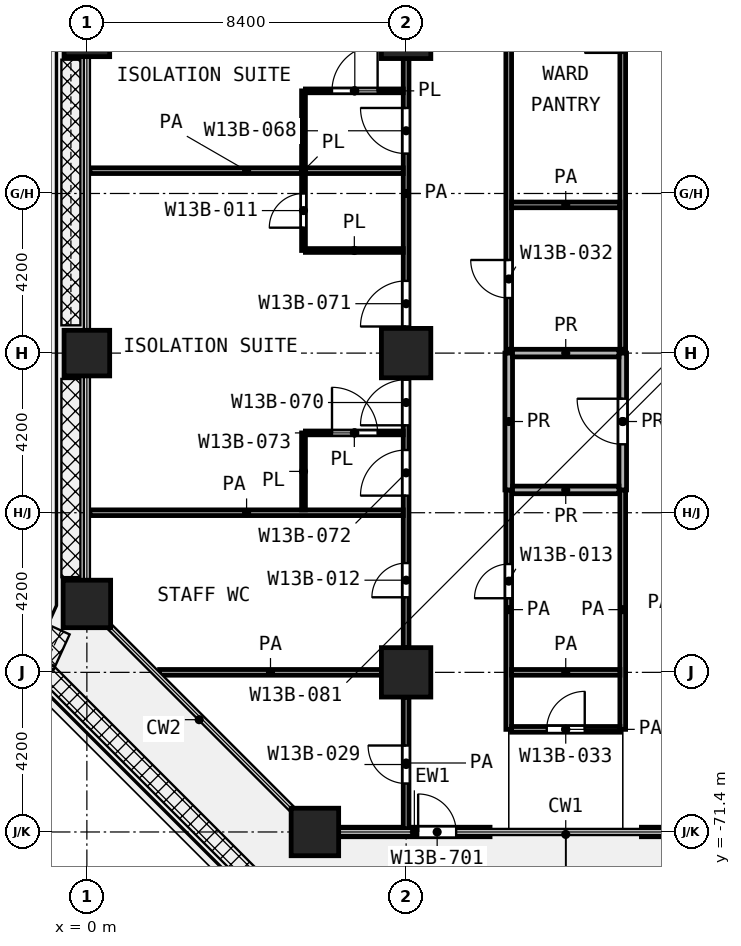
"""IFC4 building model, lengths in metres.
Left out: names, types, materials, properties, quantities, classifications, styles, units other than length and angle.
Written with IfcOpenShell. Run it as: python <this file> out.ifc"""

import sys

from ifc_helpers import new_model, si_unit, direction, frame, frame_2d, origin, origin_2d, place, context, subcontext, project, spatial, rectangle, extrude, element, fill, save


model = new_model("IFC4")
c1 = context("Model", 3, precision=1e-05, world=origin(), true_north=direction((0.0, 1.0)))
c2 = subcontext(c1, "Body", "Model", "MODEL_VIEW")
j1 = project(units=[si_unit("LENGTHUNIT", "METRE"), si_unit("PLANEANGLEUNIT", "RADIAN")], contexts=[c1])
p1 = place(None, origin())
s1 = spatial("IfcSite", under=j1, at=p1, CompositionType="ELEMENT")
p2 = place(p1, origin())
s2 = spatial("IfcBuilding", under=s1, at=p2, CompositionType="ELEMENT")
p3 = place(p2, frame((0.0, 0.0, 89.6)))
s3 = spatial("IfcBuildingStorey", under=s2, at=p3, CompositionType="ELEMENT", Elevation=89.6)
p4 = place(p3, frame((0.0, -50.4, 0.0), z_axis=(0.0, 0.0, 1.0), x_axis=(1.0, 0.0, 0.0)))
e1 = element("IfcColumn", 1, at=p4, inside=s3, PredefinedType="COLUMN", context=c2, shape_type="SweptSolid", body=[
    extrude(rectangle(XDim=1.2, YDim=1.2, at=origin_2d()), origin(), (0.0, 0.0, 1.0), 4.2),
])
p5 = place(p3, frame((8.4, -50.4, 0.0), z_axis=(0.0, 0.0, 1.0), x_axis=(1.0, 0.0, 0.0)))
e2 = element("IfcColumn", 2, at=p5, inside=s3, PredefinedType="COLUMN", context=c2, shape_type="SweptSolid", body=[
    extrude(rectangle(XDim=1.3, YDim=1.3, at=origin_2d()), origin(), (0.0, 0.0, 1.0), 4.2),
])
p6 = place(p3, frame((0.0, -58.8, 0.0), z_axis=(0.0, 0.0, 1.0), x_axis=(1.0, 0.0, 0.0)))
e3 = element("IfcColumn", 3, at=p6, inside=s3, PredefinedType="COLUMN", context=c2, shape_type="SweptSolid", body=[
    extrude(rectangle(XDim=1.2, YDim=1.2, at=origin_2d()), origin(), (0.0, 0.0, 1.0), 4.2),
])
p7 = place(p3, frame((8.4, -58.8, 0.0), z_axis=(0.0, 0.0, 1.0), x_axis=(1.0, 0.0, 0.0)))
e4 = element("IfcColumn", 4, at=p7, inside=s3, PredefinedType="COLUMN", context=c2, shape_type="SweptSolid", body=[
    extrude(rectangle(XDim=1.3, YDim=1.3, at=origin_2d()), origin(), (0.0, 0.0, 1.0), 4.2),
])
p8 = place(p3, frame((0.0, -65.4, 0.0), z_axis=(0.0, 0.0, 1.0), x_axis=(1.0, 0.0, 0.0)))
e5 = element("IfcColumn", 5, at=p8, inside=s3, PredefinedType="COLUMN", context=c2, shape_type="SweptSolid", body=[
    extrude(rectangle(XDim=1.25, YDim=1.25, at=origin_2d()), origin(), (0.0, 0.0, 1.0), 4.2),
])
p9 = place(p3, frame((8.4, -67.2, 0.0), z_axis=(0.0, 0.0, 1.0), x_axis=(1.0, 0.0, 0.0)))
e6 = element("IfcColumn", 6, at=p9, inside=s3, PredefinedType="COLUMN", context=c2, shape_type="SweptSolid", body=[
    extrude(rectangle(XDim=1.3, YDim=1.3, at=origin_2d()), origin(), (0.0, 0.0, 1.0), 4.2),
])
p10 = place(p3, frame((6.0, -71.4, 0.0), z_axis=(0.0, 0.0, 1.0), x_axis=(1.0, 0.0, 0.0)))
e7 = element("IfcColumn", 7, at=p10, inside=s3, PredefinedType="COLUMN", context=c2, shape_type="SweptSolid", body=[
    extrude(rectangle(XDim=1.25, YDim=1.25, at=origin_2d()), origin(), (0.0, 0.0, 1.0), 4.2),
])
p11 = place(p3, frame((6.625, -71.4, 0.0), z_axis=(0.0, 0.0, 1.0), x_axis=(1.0, 0.0, 0.0)))
e8 = element("IfcWall", 8, at=p11, inside=s3, PredefinedType="SOLIDWALL", context=c2, shape_type="SweptSolid", body=[
    extrude(rectangle(XDim=3.983, YDim=0.25, at=frame_2d((1.992, 0.0))), origin(), (0.0, 0.0, 1.0), 3.58),
])
p12 = place(p11, frame((2.092, 0.0, 0.0)))
e9 = element("IfcOpeningElement", 9, at=p12, cuts=e8, PredefinedType="OPENING", context=c2, shape_type="SweptSolid", body=[
    extrude(rectangle(XDim=1.0, YDim=2.1, at=frame_2d((0.5, 1.05))), frame((0.0, 0.135, 0.0), z_axis=(0.0, -1.0, 0.0), x_axis=(1.0, 0.0, 0.0)), (0.0, 0.0, 1.0), 0.27),
])
p13 = place(p3, frame((14.592, -71.4, 0.0), z_axis=(0.0, 0.0, 1.0), x_axis=(1.0, 0.0, 0.0)))
e10 = element("IfcWall", 10, at=p13, inside=s3, PredefinedType="SOLIDWALL", context=c2, shape_type="SweptSolid", body=[
    extrude(rectangle(XDim=3.983, YDim=0.25, at=frame_2d((1.992, 0.0))), origin(), (0.0, 0.0, 1.0), 3.58),
])
p14 = place(p13, frame((0.892, 0.0, 0.0)))
e11 = element("IfcOpeningElement", 11, at=p14, cuts=e10, PredefinedType="OPENING", context=c2, shape_type="SweptSolid", body=[
    extrude(rectangle(XDim=1.0, YDim=2.1, at=frame_2d((0.5, 1.05))), frame((0.0, 0.135, 0.0), z_axis=(0.0, -1.0, 0.0), x_axis=(1.0, 0.0, 0.0)), (0.0, 0.0, 1.0), 0.27),
])
p15 = place(p3, frame((5.75, -60.9, 0.0), z_axis=(0.0, 0.0, 1.0), x_axis=(1.0, 0.0, 0.0)))
e12 = element("IfcWall", 12, at=p15, inside=s3, PredefinedType="PARTITIONING", context=c2, shape_type="SweptSolid", body=[
    extrude(rectangle(XDim=2.575, YDim=0.1, at=frame_2d((1.288, 0.0))), origin(), (0.0, 0.0, 1.0), 3.7),
])
p16 = place(p15, frame((0.7, 0.0, 0.0)))
e13 = element("IfcOpeningElement", 13, at=p16, cuts=e12, PredefinedType="OPENING", context=c2, shape_type="SweptSolid", body=[
    extrude(rectangle(XDim=1.2, YDim=2.1, at=frame_2d((0.6, 1.05))), frame((0.0, 0.06, 0.0), z_axis=(0.0, -1.0, 0.0), x_axis=(1.0, 0.0, 0.0)), (0.0, 0.0, 1.0), 0.12),
])
p17 = place(p3, frame((5.75, -56.1, 0.0), z_axis=(0.0, 0.0, 1.0), x_axis=(1.0, 0.0, 0.0)))
e14 = element("IfcWall", 14, at=p17, inside=s3, PredefinedType="PARTITIONING", context=c2, shape_type="SweptSolid", body=[
    extrude(rectangle(XDim=2.575, YDim=0.1, at=frame_2d((1.288, 0.0))), origin(), (0.0, 0.0, 1.0), 3.7),
])
p18 = place(p3, frame((5.75, -51.9, 0.0), z_axis=(0.0, 0.0, 1.0), x_axis=(1.0, 0.0, 0.0)))
e15 = element("IfcWall", 15, at=p18, inside=s3, PredefinedType="PARTITIONING", context=c2, shape_type="SweptSolid", body=[
    extrude(rectangle(XDim=2.575, YDim=0.1, at=frame_2d((1.288, 0.0))), origin(), (0.0, 0.0, 1.0), 3.7),
])
p19 = place(p18, frame((0.7, 0.0, 0.0)))
e16 = element("IfcOpeningElement", 16, at=p19, cuts=e15, PredefinedType="OPENING", context=c2, shape_type="SweptSolid", body=[
    extrude(rectangle(XDim=1.2, YDim=2.1, at=frame_2d((0.6, 1.05))), frame((0.0, 0.06, 0.0), z_axis=(0.0, -1.0, 0.0), x_axis=(1.0, 0.0, 0.0)), (0.0, 0.0, 1.0), 0.12),
])
p20 = place(p3, frame((5.7, -62.925, 0.0), z_axis=(0.0, 0.0, 1.0), x_axis=(0.0, 1.0, 0.0)))
e17 = element("IfcWall", 17, at=p20, inside=s3, PredefinedType="PARTITIONING", context=c2, shape_type="SweptSolid", body=[
    extrude(rectangle(XDim=2.025, YDim=0.1, at=frame_2d((1.013, 0.0))), origin(), (0.0, 0.0, 1.0), 3.7),
])
p21 = place(p3, frame((5.7, -56.1, 0.0), z_axis=(0.0, 0.0, 1.0), x_axis=(0.0, 1.0, 0.0)))
e18 = element("IfcWall", 18, at=p21, inside=s3, PredefinedType="PARTITIONING", context=c2, shape_type="SweptSolid", body=[
    extrude(rectangle(XDim=4.2, YDim=0.1, at=frame_2d((2.1, 0.0))), origin(), (0.0, 0.0, 1.0), 3.7),
])
p22 = place(p21, frame((0.6, 0.0, 0.0)))
e19 = element("IfcOpeningElement", 19, at=p22, cuts=e18, PredefinedType="OPENING", context=c2, shape_type="SweptSolid", body=[
    extrude(rectangle(XDim=0.9, YDim=2.1, at=frame_2d((0.45, 1.05))), frame((0.0, 0.06, 0.0), z_axis=(0.0, -1.0, 0.0), x_axis=(1.0, 0.0, 0.0)), (0.0, 0.0, 1.0), 0.12),
])
p23 = place(p3, frame((11.175, -68.7, 0.0), z_axis=(0.0, 0.0, 1.0), x_axis=(1.0, 0.0, 0.0)))
e20 = element("IfcWall", 20, at=p23, inside=s3, PredefinedType="PARTITIONING", context=c2, shape_type="SweptSolid", body=[
    extrude(rectangle(XDim=2.85, YDim=0.15, at=frame_2d((1.425, 0.0))), origin(), (0.0, 0.0, 1.0), 3.7),
])
p24 = place(p23, frame((0.925, 0.0, 0.0)))
e21 = element("IfcOpeningElement", 21, at=p24, cuts=e20, PredefinedType="OPENING", context=c2, shape_type="SweptSolid", body=[
    extrude(rectangle(XDim=1.0, YDim=2.1, at=frame_2d((0.5, 1.05))), frame((0.0, 0.085, 0.0), z_axis=(0.0, -1.0, 0.0), x_axis=(1.0, 0.0, 0.0)), (0.0, 0.0, 1.0), 0.17),
])
p25 = place(p3, frame((1.913, -67.2, 0.0), z_axis=(0.0, 0.0, 1.0), x_axis=(1.0, 0.0, 0.0)))
e22 = element("IfcWall", 22, at=p25, inside=s3, PredefinedType="PARTITIONING", context=c2, shape_type="SweptSolid", body=[
    extrude(rectangle(XDim=5.837, YDim=0.15, at=frame_2d((2.918, 0.0))), origin(), (0.0, 0.0, 1.0), 3.7),
])
p26 = place(p3, frame((11.175, -67.2, 0.0), z_axis=(0.0, 0.0, 1.0), x_axis=(1.0, 0.0, 0.0)))
e23 = element("IfcWall", 23, at=p26, inside=s3, PredefinedType="PARTITIONING", context=c2, shape_type="SweptSolid", body=[
    extrude(rectangle(XDim=2.85, YDim=0.15, at=frame_2d((1.425, 0.0))), origin(), (0.0, 0.0, 1.0), 3.7),
])
p27 = place(p3, frame((0.08, -63.0, 0.0), z_axis=(0.0, 0.0, 1.0), x_axis=(1.0, 0.0, 0.0)))
e24 = element("IfcWall", 24, at=p27, inside=s3, PredefinedType="PARTITIONING", context=c2, shape_type="SweptSolid", body=[
    extrude(rectangle(XDim=8.245, YDim=0.15, at=frame_2d((4.123, 0.0))), origin(), (0.0, 0.0, 1.0), 3.7),
])
p28 = place(p3, frame((11.175, -54.9, 0.0), z_axis=(0.0, 0.0, 1.0), x_axis=(1.0, 0.0, 0.0)))
e25 = element("IfcWall", 25, at=p28, inside=s3, PredefinedType="PARTITIONING", context=c2, shape_type="SweptSolid", body=[
    extrude(rectangle(XDim=2.85, YDim=0.15, at=frame_2d((1.425, 0.0))), origin(), (0.0, 0.0, 1.0), 3.7),
])
p29 = place(p3, frame((0.08, -54.0, 0.0), z_axis=(0.0, 0.0, 1.0), x_axis=(1.0, 0.0, 0.0)))
e26 = element("IfcWall", 26, at=p29, inside=s3, PredefinedType="PARTITIONING", context=c2, shape_type="SweptSolid", body=[
    extrude(rectangle(XDim=8.245, YDim=0.15, at=frame_2d((4.123, 0.0))), origin(), (0.0, 0.0, 1.0), 3.7),
])
p30 = place(p3, frame((8.4, -71.32, 0.0), z_axis=(0.0, 0.0, 1.0), x_axis=(0.0, 1.0, 0.0)))
e27 = element("IfcWall", 27, at=p30, inside=s3, PredefinedType="PARTITIONING", context=c2, shape_type="SweptSolid", body=[
    extrude(rectangle(XDim=3.47, YDim=0.15, at=frame_2d((1.735, 0.0))), origin(), (0.0, 0.0, 1.0), 3.7),
])
p31 = place(p30, frame((1.195, 0.0, 0.0)))
e28 = element("IfcOpeningElement", 28, at=p31, cuts=e27, PredefinedType="OPENING", context=c2, shape_type="SweptSolid", body=[
    extrude(rectangle(XDim=1.0, YDim=2.1, at=frame_2d((0.5, 1.05))), frame((0.0, 0.085, 0.0), z_axis=(0.0, -1.0, 0.0), x_axis=(1.0, 0.0, 0.0)), (0.0, 0.0, 1.0), 0.17),
])
p32 = place(p3, frame((8.4, -66.55, 0.0), z_axis=(0.0, 0.0, 1.0), x_axis=(0.0, 1.0, 0.0)))
e29 = element("IfcWall", 29, at=p32, inside=s3, PredefinedType="PARTITIONING", context=c2, shape_type="SweptSolid", body=[
    extrude(rectangle(XDim=23.9, YDim=0.15, at=frame_2d((11.95, 0.0))), origin(), (0.0, 0.0, 1.0), 3.7),
])
p33 = place(p32, frame((16.825, 0.0, 0.0)))
e30 = element("IfcOpeningElement", 30, at=p33, cuts=e29, PredefinedType="OPENING", context=c2, shape_type="SweptSolid", body=[
    extrude(rectangle(XDim=0.9, YDim=2.1, at=frame_2d((0.45, 1.05))), frame((0.0, 0.085, 0.0), z_axis=(0.0, -1.0, 0.0), x_axis=(1.0, 0.0, 0.0)), (0.0, 0.0, 1.0), 0.17),
])
p34 = place(p32, frame((13.0, 0.0, 0.0)))
e31 = element("IfcOpeningElement", 31, at=p34, cuts=e29, PredefinedType="OPENING", context=c2, shape_type="SweptSolid", body=[
    extrude(rectangle(XDim=1.2, YDim=2.1, at=frame_2d((0.6, 1.05))), frame((0.0, 0.085, 0.0), z_axis=(0.0, -1.0, 0.0), x_axis=(1.0, 0.0, 0.0)), (0.0, 0.0, 1.0), 0.17),
])
p35 = place(p32, frame((5.85, 0.0, 0.0)))
e32 = element("IfcOpeningElement", 32, at=p35, cuts=e29, PredefinedType="OPENING", context=c2, shape_type="SweptSolid", body=[
    extrude(rectangle(XDim=1.2, YDim=2.1, at=frame_2d((0.6, 1.05))), frame((0.0, 0.085, 0.0), z_axis=(0.0, -1.0, 0.0), x_axis=(1.0, 0.0, 0.0)), (0.0, 0.0, 1.0), 0.17),
])
p36 = place(p32, frame((8.45, 0.0, 0.0)))
e33 = element("IfcOpeningElement", 33, at=p36, cuts=e29, PredefinedType="OPENING", context=c2, shape_type="SweptSolid", body=[
    extrude(rectangle(XDim=1.2, YDim=2.1, at=frame_2d((0.6, 1.05))), frame((0.0, 0.085, 0.0), z_axis=(0.0, -1.0, 0.0), x_axis=(1.0, 0.0, 0.0)), (0.0, 0.0, 1.0), 0.17),
])
p37 = place(p32, frame((4.0, 0.0, 0.0)))
e34 = element("IfcOpeningElement", 34, at=p37, cuts=e29, PredefinedType="OPENING", context=c2, shape_type="SweptSolid", body=[
    extrude(rectangle(XDim=1.2, YDim=2.1, at=frame_2d((0.6, 1.05))), frame((0.0, 0.085, 0.0), z_axis=(0.0, -1.0, 0.0), x_axis=(1.0, 0.0, 0.0)), (0.0, 0.0, 1.0), 0.17),
])
p38 = place(p32, frame((1.325, 0.0, 0.0)))
e35 = element("IfcOpeningElement", 35, at=p38, cuts=e29, PredefinedType="OPENING", context=c2, shape_type="SweptSolid", body=[
    extrude(rectangle(XDim=0.9, YDim=2.1, at=frame_2d((0.45, 1.05))), frame((0.0, 0.085, 0.0), z_axis=(0.0, -1.0, 0.0), x_axis=(1.0, 0.0, 0.0)), (0.0, 0.0, 1.0), 0.17),
])
p39 = place(p3, frame((11.1, -68.7, 0.0), z_axis=(0.0, 0.0, 1.0), x_axis=(0.0, 1.0, 0.0)))
e36 = element("IfcWall", 36, at=p39, inside=s3, PredefinedType="PARTITIONING", context=c2, shape_type="SweptSolid", body=[
    extrude(rectangle(XDim=6.3, YDim=0.15, at=frame_2d((3.15, 0.0))), origin(), (0.0, 0.0, 1.0), 3.7),
])
p40 = place(p39, frame((3.45, 0.0, 0.0)))
e37 = element("IfcOpeningElement", 37, at=p40, cuts=e36, PredefinedType="OPENING", context=c2, shape_type="SweptSolid", body=[
    extrude(rectangle(XDim=0.9, YDim=2.1, at=frame_2d((0.45, 1.05))), frame((0.0, 0.085, 0.0), z_axis=(0.0, -1.0, 0.0), x_axis=(1.0, 0.0, 0.0)), (0.0, 0.0, 1.0), 0.17),
])
p41 = place(p3, frame((11.1, -58.7, 0.0), z_axis=(0.0, 0.0, 1.0), x_axis=(0.0, 1.0, 0.0)))
e38 = element("IfcWall", 38, at=p41, inside=s3, PredefinedType="PARTITIONING", context=c2, shape_type="SweptSolid", body=[
    extrude(rectangle(XDim=29.3, YDim=0.15, at=frame_2d((14.65, 0.0))), origin(), (0.0, 0.0, 1.0), 3.7),
])
p42 = place(p41, frame((20.55, 0.0, 0.0)))
e39 = element("IfcOpeningElement", 39, at=p42, cuts=e38, PredefinedType="OPENING", context=c2, shape_type="SweptSolid", body=[
    extrude(rectangle(XDim=1.0, YDim=2.1, at=frame_2d((0.5, 1.05))), frame((0.0, 0.085, 0.0), z_axis=(0.0, -1.0, 0.0), x_axis=(1.0, 0.0, 0.0)), (0.0, 0.0, 1.0), 0.17),
])
p43 = place(p41, frame((1.35, 0.0, 0.0)))
e40 = element("IfcOpeningElement", 40, at=p43, cuts=e38, PredefinedType="OPENING", context=c2, shape_type="SweptSolid", body=[
    extrude(rectangle(XDim=1.0, YDim=2.1, at=frame_2d((0.5, 1.05))), frame((0.0, 0.085, 0.0), z_axis=(0.0, -1.0, 0.0), x_axis=(1.0, 0.0, 0.0)), (0.0, 0.0, 1.0), 0.17),
])
p44 = place(p3, frame((14.1, -68.7, 0.0), z_axis=(0.0, 0.0, 1.0), x_axis=(0.0, 1.0, 0.0)))
e41 = element("IfcWall", 41, at=p44, inside=s3, PredefinedType="PARTITIONING", context=c2, shape_type="SweptSolid", body=[
    extrude(rectangle(XDim=6.3, YDim=0.15, at=frame_2d((3.15, 0.0))), origin(), (0.0, 0.0, 1.0), 3.7),
])
p45 = place(p3, frame((14.1, -58.7, 0.0), z_axis=(0.0, 0.0, 1.0), x_axis=(0.0, 1.0, 0.0)))
e42 = element("IfcWall", 42, at=p45, inside=s3, PredefinedType="PARTITIONING", context=c2, shape_type="SweptSolid", body=[
    extrude(rectangle(XDim=29.3, YDim=0.15, at=frame_2d((14.65, 0.0))), origin(), (0.0, 0.0, 1.0), 3.7),
])
p46 = place(p45, frame((7.8, 0.0, 0.0)))
e43 = element("IfcOpeningElement", 43, at=p46, cuts=e42, PredefinedType="OPENING", context=c2, shape_type="SweptSolid", body=[
    extrude(rectangle(XDim=1.0, YDim=2.1, at=frame_2d((0.5, 1.05))), frame((0.0, 0.085, 0.0), z_axis=(0.0, -1.0, 0.0), x_axis=(1.0, 0.0, 0.0)), (0.0, 0.0, 1.0), 0.17),
])
for number, where, z_axis, x_axis in (
    (44, (11.2, -62.4, 0.0), (0.0, 0.0, 1.0), (1.0, 0.0, 0.0)),
    (45, (11.2, -58.8, 0.0), (0.0, 0.0, 1.0), (1.0, 0.0, 0.0)),
):
    element("IfcWall", number, at=place(p3, frame(where, z_axis=z_axis, x_axis=x_axis)), inside=s3, PredefinedType="PARTITIONING", context=c2, shape_type="SweptSolid", body=[
        extrude(rectangle(XDim=2.8, YDim=0.2, at=frame_2d((1.4, 0.0))), origin(), (0.0, 0.0, 1.0), 3.7),
    ])
p47 = place(p3, frame((11.1, -62.4, 0.0), z_axis=(0.0, 0.0, 1.0), x_axis=(0.0, 1.0, 0.0)))
e46 = element("IfcWall", 46, at=p47, inside=s3, PredefinedType="PARTITIONING", context=c2, shape_type="SweptSolid", body=[
    extrude(rectangle(XDim=3.6, YDim=0.2, at=frame_2d((1.8, 0.0))), origin(), (0.0, 0.0, 1.0), 3.7),
])
p48 = place(p3, frame((14.1, -62.4, 0.0), z_axis=(0.0, 0.0, 1.0), x_axis=(0.0, 1.0, 0.0)))
e47 = element("IfcWall", 47, at=p48, inside=s3, PredefinedType="PARTITIONING", context=c2, shape_type="SweptSolid", body=[
    extrude(rectangle(XDim=3.6, YDim=0.2, at=frame_2d((1.8, 0.0))), origin(), (0.0, 0.0, 1.0), 3.7),
])
p49 = place(p48, frame((1.2, 0.0, 0.0)))
e48 = element("IfcOpeningElement", 48, at=p49, cuts=e47, PredefinedType="OPENING", context=c2, shape_type="SweptSolid", body=[
    extrude(rectangle(XDim=1.2, YDim=2.1, at=frame_2d((0.6, 1.05))), frame((0.0, 0.11, 0.0), z_axis=(0.0, -1.0, 0.0), x_axis=(1.0, 0.0, 0.0)), (0.0, 0.0, 1.0), 0.22),
])
p50 = place(p12, origin())
e49 = element("IfcDoor", 49, at=p50, inside=s3, OperationType="SINGLE_SWING_LEFT", PredefinedType="DOOR", context=c2, shape_type="SweptSolid", body=[
    extrude(rectangle(XDim=1.0, YDim=2.1, at=frame_2d((0.5, 1.05))), frame((0.0, 0.025, 0.0), z_axis=(0.0, -1.0, 0.0), x_axis=(1.0, 0.0, 0.0)), (0.0, 0.0, 1.0), 0.05),
])
fill(e9, e49)
p51 = place(p34, origin())
e50 = element("IfcDoor", 50, at=p51, inside=s3, OperationType="SINGLE_SWING_RIGHT", PredefinedType="DOOR", context=c2, shape_type="SweptSolid", body=[
    extrude(rectangle(XDim=1.2, YDim=2.1, at=frame_2d((0.6, 1.05))), frame((0.0, 0.025, 0.0), z_axis=(0.0, -1.0, 0.0), x_axis=(1.0, 0.0, 0.0)), (0.0, 0.0, 1.0), 0.05),
])
fill(e31, e50)
p52 = place(p19, origin())
e51 = element("IfcDoor", 51, at=p52, inside=s3, OperationType="SINGLE_SWING_RIGHT", PredefinedType="DOOR", context=c2, shape_type="SweptSolid", body=[
    extrude(rectangle(XDim=1.2, YDim=2.1, at=frame_2d((0.6, 1.05))), frame((0.0, 0.025, 0.0), z_axis=(0.0, -1.0, 0.0), x_axis=(1.0, 0.0, 0.0)), (0.0, 0.0, 1.0), 0.05),
])
fill(e16, e51)
p53 = place(p35, origin())
e52 = element("IfcDoor", 52, at=p53, inside=s3, OperationType="SINGLE_SWING_LEFT", PredefinedType="DOOR", context=c2, shape_type="SweptSolid", body=[
    extrude(rectangle(XDim=1.2, YDim=2.1, at=frame_2d((0.6, 1.05))), frame((0.0, 0.025, 0.0), z_axis=(0.0, -1.0, 0.0), x_axis=(1.0, 0.0, 0.0)), (0.0, 0.0, 1.0), 0.05),
])
fill(e32, e52)
p54 = place(p36, origin())
e53 = element("IfcDoor", 53, at=p54, inside=s3, OperationType="SINGLE_SWING_LEFT", PredefinedType="DOOR", context=c2, shape_type="SweptSolid", body=[
    extrude(rectangle(XDim=1.2, YDim=2.1, at=frame_2d((0.6, 1.05))), frame((0.0, 0.025, 0.0), z_axis=(0.0, -1.0, 0.0), x_axis=(1.0, 0.0, 0.0)), (0.0, 0.0, 1.0), 0.05),
])
fill(e33, e53)
p55 = place(p37, origin())
e54 = element("IfcDoor", 54, at=p55, inside=s3, OperationType="SINGLE_SWING_LEFT", PredefinedType="DOOR", context=c2, shape_type="SweptSolid", body=[
    extrude(rectangle(XDim=1.2, YDim=2.1, at=frame_2d((0.6, 1.05))), frame((0.0, 0.025, 0.0), z_axis=(0.0, -1.0, 0.0), x_axis=(1.0, 0.0, 0.0)), (0.0, 0.0, 1.0), 0.05),
])
fill(e34, e54)
p56 = place(p16, origin())
e55 = element("IfcDoor", 55, at=p56, inside=s3, OperationType="SINGLE_SWING_LEFT", PredefinedType="DOOR", context=c2, shape_type="SweptSolid", body=[
    extrude(rectangle(XDim=1.2, YDim=2.1, at=frame_2d((0.6, 1.05))), frame((0.0, 0.025, 0.0), z_axis=(0.0, -1.0, 0.0), x_axis=(1.0, 0.0, 0.0)), (0.0, 0.0, 1.0), 0.05),
])
fill(e13, e55)
p57 = place(p22, origin())
e56 = element("IfcDoor", 56, at=p57, inside=s3, OperationType="SINGLE_SWING_LEFT", PredefinedType="DOOR", context=c2, shape_type="SweptSolid", body=[
    extrude(rectangle(XDim=0.9, YDim=2.1, at=frame_2d((0.45, 1.05))), frame((0.0, 0.025, 0.0), z_axis=(0.0, -1.0, 0.0), x_axis=(1.0, 0.0, 0.0)), (0.0, 0.0, 1.0), 0.05),
])
fill(e19, e56)
p58 = place(p38, origin())
e57 = element("IfcDoor", 57, at=p58, inside=s3, OperationType="SINGLE_SWING_LEFT", PredefinedType="DOOR", context=c2, shape_type="SweptSolid", body=[
    extrude(rectangle(XDim=0.9, YDim=2.1, at=frame_2d((0.45, 1.05))), frame((0.0, 0.025, 0.0), z_axis=(0.0, -1.0, 0.0), x_axis=(1.0, 0.0, 0.0)), (0.0, 0.0, 1.0), 0.05),
])
fill(e35, e57)
p59 = place(p31, origin())
e58 = element("IfcDoor", 58, at=p59, inside=s3, OperationType="SINGLE_SWING_RIGHT", PredefinedType="DOOR", context=c2, shape_type="SweptSolid", body=[
    extrude(rectangle(XDim=1.0, YDim=2.1, at=frame_2d((0.5, 1.05))), frame((0.0, 0.025, 0.0), z_axis=(0.0, -1.0, 0.0), x_axis=(1.0, 0.0, 0.0)), (0.0, 0.0, 1.0), 0.05),
])
fill(e28, e58)
p60 = place(p43, origin())
e59 = element("IfcDoor", 59, at=p60, inside=s3, OperationType="SINGLE_SWING_RIGHT", PredefinedType="DOOR", context=c2, shape_type="SweptSolid", body=[
    extrude(rectangle(XDim=1.0, YDim=2.1, at=frame_2d((0.5, 1.05))), frame((0.0, 0.025, 0.0), z_axis=(0.0, -1.0, 0.0), x_axis=(1.0, 0.0, 0.0)), (0.0, 0.0, 1.0), 0.05),
])
fill(e40, e59)
p61 = place(p49, origin())
e60 = element("IfcDoor", 60, at=p61, inside=s3, OperationType="SINGLE_SWING_RIGHT", PredefinedType="DOOR", context=c2, shape_type="SweptSolid", body=[
    extrude(rectangle(XDim=1.2, YDim=2.1, at=frame_2d((0.6, 1.05))), frame((0.0, 0.025, 0.0), z_axis=(0.0, -1.0, 0.0), x_axis=(1.0, 0.0, 0.0)), (0.0, 0.0, 1.0), 0.05),
])
fill(e48, e60)
p62 = place(p40, origin())
e61 = element("IfcDoor", 61, at=p62, inside=s3, OperationType="SINGLE_SWING_LEFT", PredefinedType="DOOR", context=c2, shape_type="SweptSolid", body=[
    extrude(rectangle(XDim=0.9, YDim=2.1, at=frame_2d((0.45, 1.05))), frame((0.0, 0.025, 0.0), z_axis=(0.0, -1.0, 0.0), x_axis=(1.0, 0.0, 0.0)), (0.0, 0.0, 1.0), 0.05),
])
fill(e37, e61)
p63 = place(p24, origin())
e62 = element("IfcDoor", 62, at=p63, inside=s3, OperationType="SINGLE_SWING_RIGHT", PredefinedType="DOOR", context=c2, shape_type="SweptSolid", body=[
    extrude(rectangle(XDim=1.0, YDim=2.1, at=frame_2d((0.5, 1.05))), frame((0.0, 0.025, 0.0), z_axis=(0.0, -1.0, 0.0), x_axis=(1.0, 0.0, 0.0)), (0.0, 0.0, 1.0), 0.05),
])
fill(e21, e62)
save(model, sys.argv[1])
